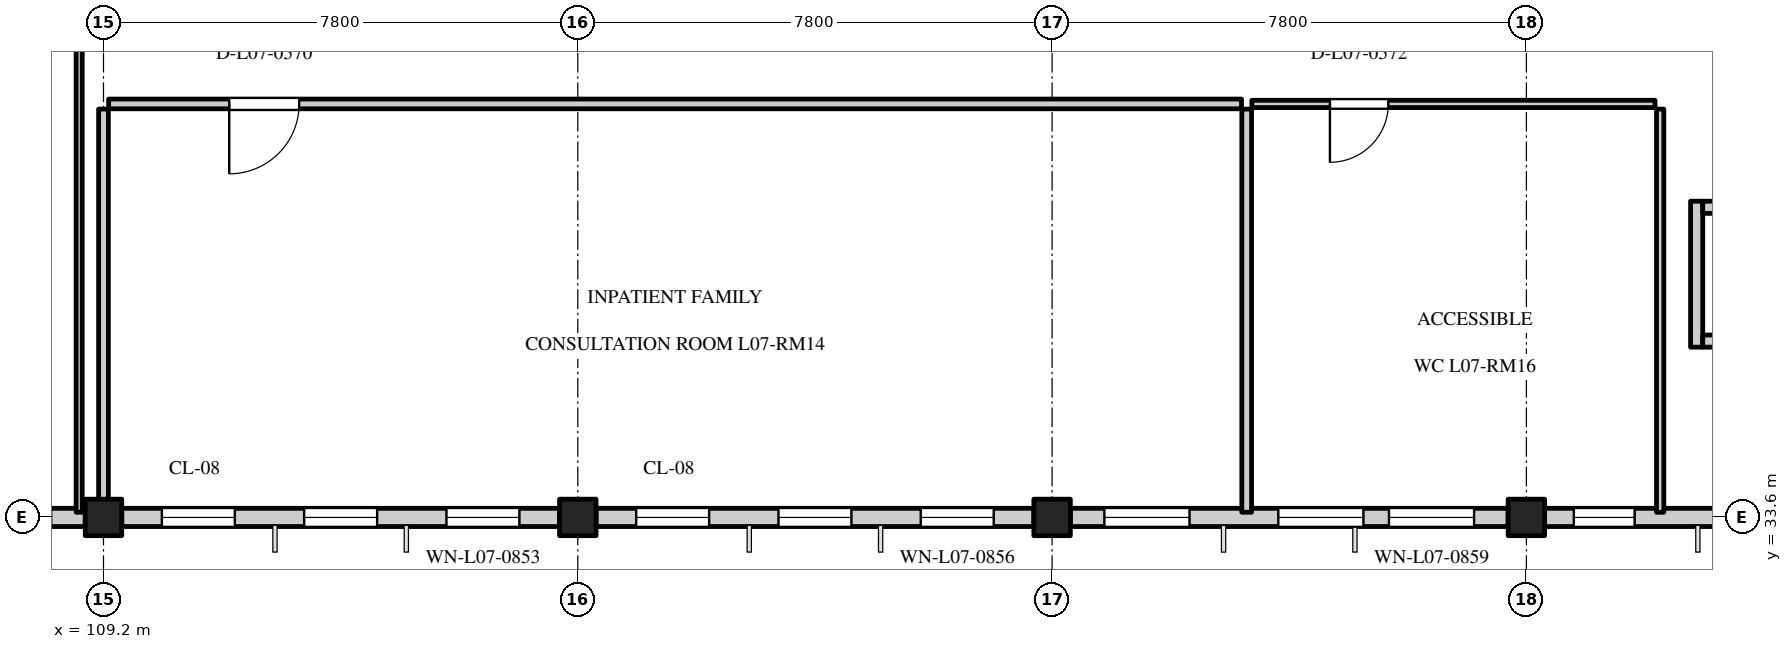
"""IFC4 building model, lengths in metres.
Left out: names, types, materials, properties, quantities, classifications, styles, units other than length and angle.
Written with IfcOpenShell. Run it as: python <this file> out.ifc"""

import sys

from ifc_helpers import new_model, si_unit, direction, frame, frame_2d, origin, origin_2d, place, context, subcontext, project, spatial, rectangle, extrude, element, fill, save


model = new_model("IFC4")
c1 = context("Model", 3, precision=1e-05, world=origin(), true_north=direction((0.0, 1.0)))
c2 = subcontext(c1, "Body", "Model", "MODEL_VIEW")
j1 = project(units=[si_unit("LENGTHUNIT", "METRE"), si_unit("PLANEANGLEUNIT", "RADIAN")], contexts=[c1])
p1 = place(None, origin())
s1 = spatial("IfcSite", under=j1, at=p1, CompositionType="ELEMENT")
p2 = place(p1, origin())
s2 = spatial("IfcBuilding", under=s1, at=p2, CompositionType="ELEMENT")
p3 = place(p2, frame((0.0, 0.0, 29.7)))
s3 = spatial("IfcBuildingStorey", under=s2, at=p3, CompositionType="ELEMENT", Elevation=29.7)
for number, where, z_axis, x_axis in (
    (1, (109.2, 33.6, 0.0), (0.0, 0.0, 1.0), (1.0, 0.0, 0.0)),
    (2, (117.0, 33.6, 0.0), (0.0, 0.0, 1.0), (1.0, 0.0, 0.0)),
    (3, (124.8, 33.6, 0.0), (0.0, 0.0, 1.0), (1.0, 0.0, 0.0)),
    (4, (132.6, 33.6, 0.0), (0.0, 0.0, 1.0), (1.0, 0.0, 0.0)),
):
    element("IfcColumn", number, at=place(p3, frame(where, z_axis=z_axis, x_axis=x_axis)), inside=s3, PredefinedType="COLUMN", context=c2, shape_type="SweptSolid", body=[
        extrude(rectangle(XDim=0.6, YDim=0.6, at=origin_2d()), origin(), (0.0, 0.0, 1.0), 4.2),
    ])
p4 = place(p3, frame((101.7, 33.6, 0.0), z_axis=(0.0, 0.0, 1.0), x_axis=(1.0, 0.0, 0.0)))
e5 = element("IfcWall", 5, at=p4, inside=s3, PredefinedType="STANDARD", context=c2, shape_type="SweptSolid", body=[
    extrude(rectangle(XDim=7.2, YDim=0.3, at=frame_2d((3.6, 0.0))), origin(), (0.0, 0.0, 1.0), 3.25),
])
p5 = place(p4, frame((0.56, 0.0, 0.8)))
e6 = element("IfcOpeningElement", 6, at=p5, cuts=e5, PredefinedType="OPENING", context=c2, shape_type="SweptSolid", body=[
    extrude(rectangle(XDim=1.4, YDim=1.45, at=frame_2d((0.7, 0.725))), frame((0.0, 0.162, 0.0), z_axis=(0.0, -1.0, 0.0), x_axis=(1.0, 0.0, 0.0)), (0.0, 0.0, 1.0), 0.324),
])
p6 = place(p4, frame((2.9, 0.0, 0.8)))
e7 = element("IfcOpeningElement", 7, at=p6, cuts=e5, PredefinedType="OPENING", context=c2, shape_type="SweptSolid", body=[
    extrude(rectangle(XDim=1.4, YDim=1.45, at=frame_2d((0.7, 0.725))), frame((0.0, 0.162, 0.0), z_axis=(0.0, -1.0, 0.0), x_axis=(1.0, 0.0, 0.0)), (0.0, 0.0, 1.0), 0.324),
])
p7 = place(p4, frame((5.24, 0.0, 0.8)))
e8 = element("IfcOpeningElement", 8, at=p7, cuts=e5, PredefinedType="OPENING", context=c2, shape_type="SweptSolid", body=[
    extrude(rectangle(XDim=1.4, YDim=1.45, at=frame_2d((0.7, 0.725))), frame((0.0, 0.162, 0.0), z_axis=(0.0, -1.0, 0.0), x_axis=(1.0, 0.0, 0.0)), (0.0, 0.0, 1.0), 0.324),
])
p8 = place(p3, frame((109.5, 33.6, 0.0), z_axis=(0.0, 0.0, 1.0), x_axis=(1.0, 0.0, 0.0)))
e9 = element("IfcWall", 9, at=p8, inside=s3, PredefinedType="STANDARD", context=c2, shape_type="SweptSolid", body=[
    extrude(rectangle(XDim=7.2, YDim=0.3, at=frame_2d((3.6, 0.0))), origin(), (0.0, 0.0, 1.0), 3.25),
])
p9 = place(p8, frame((0.66, 0.0, 0.8)))
e10 = element("IfcOpeningElement", 10, at=p9, cuts=e9, PredefinedType="OPENING", context=c2, shape_type="SweptSolid", body=[
    extrude(rectangle(XDim=1.2, YDim=1.55, at=frame_2d((0.6, 0.775))), frame((0.0, 0.162, 0.0), z_axis=(0.0, -1.0, 0.0), x_axis=(1.0, 0.0, 0.0)), (0.0, 0.0, 1.0), 0.324),
])
p10 = place(p8, frame((3.0, 0.0, 0.8)))
e11 = element("IfcOpeningElement", 11, at=p10, cuts=e9, PredefinedType="OPENING", context=c2, shape_type="SweptSolid", body=[
    extrude(rectangle(XDim=1.2, YDim=1.55, at=frame_2d((0.6, 0.775))), frame((0.0, 0.162, 0.0), z_axis=(0.0, -1.0, 0.0), x_axis=(1.0, 0.0, 0.0)), (0.0, 0.0, 1.0), 0.324),
])
p11 = place(p8, frame((5.34, 0.0, 0.8)))
e12 = element("IfcOpeningElement", 12, at=p11, cuts=e9, PredefinedType="OPENING", context=c2, shape_type="SweptSolid", body=[
    extrude(rectangle(XDim=1.2, YDim=1.55, at=frame_2d((0.6, 0.775))), frame((0.0, 0.162, 0.0), z_axis=(0.0, -1.0, 0.0), x_axis=(1.0, 0.0, 0.0)), (0.0, 0.0, 1.0), 0.324),
])
p12 = place(p3, frame((117.3, 33.6, 0.0), z_axis=(0.0, 0.0, 1.0), x_axis=(1.0, 0.0, 0.0)))
e13 = element("IfcWall", 13, at=p12, inside=s3, PredefinedType="STANDARD", context=c2, shape_type="SweptSolid", body=[
    extrude(rectangle(XDim=7.2, YDim=0.3, at=frame_2d((3.6, 0.0))), origin(), (0.0, 0.0, 1.0), 3.25),
])
p13 = place(p12, frame((0.66, 0.0, 0.8)))
e14 = element("IfcOpeningElement", 14, at=p13, cuts=e13, PredefinedType="OPENING", context=c2, shape_type="SweptSolid", body=[
    extrude(rectangle(XDim=1.2, YDim=1.4, at=frame_2d((0.6, 0.7))), frame((0.0, 0.162, 0.0), z_axis=(0.0, -1.0, 0.0), x_axis=(1.0, 0.0, 0.0)), (0.0, 0.0, 1.0), 0.324),
])
p14 = place(p12, frame((3.0, 0.0, 0.8)))
e15 = element("IfcOpeningElement", 15, at=p14, cuts=e13, PredefinedType="OPENING", context=c2, shape_type="SweptSolid", body=[
    extrude(rectangle(XDim=1.2, YDim=1.4, at=frame_2d((0.6, 0.7))), frame((0.0, 0.162, 0.0), z_axis=(0.0, -1.0, 0.0), x_axis=(1.0, 0.0, 0.0)), (0.0, 0.0, 1.0), 0.324),
])
p15 = place(p12, frame((5.34, 0.0, 0.8)))
e16 = element("IfcOpeningElement", 16, at=p15, cuts=e13, PredefinedType="OPENING", context=c2, shape_type="SweptSolid", body=[
    extrude(rectangle(XDim=1.2, YDim=1.4, at=frame_2d((0.6, 0.7))), frame((0.0, 0.162, 0.0), z_axis=(0.0, -1.0, 0.0), x_axis=(1.0, 0.0, 0.0)), (0.0, 0.0, 1.0), 0.324),
])
p16 = place(p3, frame((125.1, 33.6, 0.0), z_axis=(0.0, 0.0, 1.0), x_axis=(1.0, 0.0, 0.0)))
e17 = element("IfcWall", 17, at=p16, inside=s3, PredefinedType="STANDARD", context=c2, shape_type="SweptSolid", body=[
    extrude(rectangle(XDim=7.2, YDim=0.3, at=frame_2d((3.6, 0.0))), origin(), (0.0, 0.0, 1.0), 3.25),
])
p17 = place(p16, frame((0.56, 0.0, 0.8)))
e18 = element("IfcOpeningElement", 18, at=p17, cuts=e17, PredefinedType="OPENING", context=c2, shape_type="SweptSolid", body=[
    extrude(rectangle(XDim=1.4, YDim=1.6, at=frame_2d((0.7, 0.8))), frame((0.0, 0.162, 0.0), z_axis=(0.0, -1.0, 0.0), x_axis=(1.0, 0.0, 0.0)), (0.0, 0.0, 1.0), 0.324),
])
p18 = place(p16, frame((3.42, 0.0, 0.8)))
e19 = element("IfcOpeningElement", 19, at=p18, cuts=e17, PredefinedType="OPENING", context=c2, shape_type="SweptSolid", body=[
    extrude(rectangle(XDim=1.4, YDim=1.6, at=frame_2d((0.7, 0.8))), frame((0.0, 0.162, 0.0), z_axis=(0.0, -1.0, 0.0), x_axis=(1.0, 0.0, 0.0)), (0.0, 0.0, 1.0), 0.324),
])
p19 = place(p16, frame((5.24, 0.0, 0.8)))
e20 = element("IfcOpeningElement", 20, at=p19, cuts=e17, PredefinedType="OPENING", context=c2, shape_type="SweptSolid", body=[
    extrude(rectangle(XDim=1.4, YDim=1.6, at=frame_2d((0.7, 0.8))), frame((0.0, 0.162, 0.0), z_axis=(0.0, -1.0, 0.0), x_axis=(1.0, 0.0, 0.0)), (0.0, 0.0, 1.0), 0.324),
])
p20 = place(p3, frame((132.9, 33.6, 0.0), z_axis=(0.0, 0.0, 1.0), x_axis=(1.0, 0.0, 0.0)))
e21 = element("IfcWall", 21, at=p20, inside=s3, PredefinedType="STANDARD", context=c2, shape_type="SweptSolid", body=[
    extrude(rectangle(XDim=7.2, YDim=0.3, at=frame_2d((3.6, 0.0))), origin(), (0.0, 0.0, 1.0), 3.25),
])
p21 = place(p20, frame((0.48, 0.0, 0.8)))
e22 = element("IfcOpeningElement", 22, at=p21, cuts=e21, PredefinedType="OPENING", context=c2, shape_type="SweptSolid", body=[
    extrude(rectangle(XDim=1.0, YDim=1.45, at=frame_2d((0.5, 0.725))), frame((0.0, 0.162, 0.0), z_axis=(0.0, -1.0, 0.0), x_axis=(1.0, 0.0, 0.0)), (0.0, 0.0, 1.0), 0.324),
])
p22 = place(p20, frame((2.9, 0.0, 0.8)))
e23 = element("IfcOpeningElement", 23, at=p22, cuts=e21, PredefinedType="OPENING", context=c2, shape_type="SweptSolid", body=[
    extrude(rectangle(XDim=1.4, YDim=1.45, at=frame_2d((0.7, 0.725))), frame((0.0, 0.162, 0.0), z_axis=(0.0, -1.0, 0.0), x_axis=(1.0, 0.0, 0.0)), (0.0, 0.0, 1.0), 0.324),
])
p23 = place(p20, frame((5.24, 0.0, 0.8)))
e24 = element("IfcOpeningElement", 24, at=p23, cuts=e21, PredefinedType="OPENING", context=c2, shape_type="SweptSolid", body=[
    extrude(rectangle(XDim=1.4, YDim=1.45, at=frame_2d((0.7, 0.725))), frame((0.0, 0.162, 0.0), z_axis=(0.0, -1.0, 0.0), x_axis=(1.0, 0.0, 0.0)), (0.0, 0.0, 1.0), 0.324),
])
p24 = place(p3, frame((135.4, 36.4, 0.0), z_axis=(0.0, 0.0, 1.0), x_axis=(0.0, 1.0, 0.0)))
e25 = element("IfcWall", 25, at=p24, inside=s3, PredefinedType="STANDARD", context=c2, shape_type="SweptSolid", body=[
    extrude(rectangle(XDim=2.4, YDim=0.2, at=frame_2d((1.2, 0.0))), origin(), (0.0, 0.0, 1.0), 3.9),
])
for number, where, z_axis, x_axis in (
    (26, (135.5, 36.5, 0.0), (0.0, 0.0, 1.0), (1.0, 0.0, 0.0)),
    (27, (135.5, 38.7, 0.0), (0.0, 0.0, 1.0), (1.0, 0.0, 0.0)),
):
    element("IfcWall", number, at=place(p3, frame(where, z_axis=z_axis, x_axis=x_axis)), inside=s3, PredefinedType="STANDARD", context=c2, shape_type="SweptSolid", body=[
        extrude(rectangle(XDim=2.0, YDim=0.2, at=frame_2d((1.0, 0.0))), origin(), (0.0, 0.0, 1.0), 3.9),
    ])
p25 = place(p3, frame((108.8, 33.685, 0.0), z_axis=(0.0, 0.0, 1.0), x_axis=(0.0, 1.0, 0.0)))
e28 = element("IfcWall", 28, at=p25, inside=s3, PredefinedType="PARTITIONING", context=c2, shape_type="SweptSolid", body=[
    extrude(rectangle(XDim=11.43, YDim=0.1, at=frame_2d((5.715, 0.0))), origin(), (0.0, 0.0, 1.0), 3.88),
])
p26 = place(p3, frame((109.285, 40.4, 0.0), z_axis=(0.0, 0.0, 1.0), x_axis=(1.0, 0.0, 0.0)))
e29 = element("IfcWall", 29, at=p26, inside=s3, PredefinedType="PARTITIONING", context=c2, shape_type="SweptSolid", body=[
    extrude(rectangle(XDim=18.63, YDim=0.16, at=frame_2d((9.315, 0.0))), origin(), (0.0, 0.0, 1.0), 3.88),
])
p27 = place(p26, frame((1.983, 0.0, 0.0)))
e30 = element("IfcOpeningElement", 30, at=p27, cuts=e29, PredefinedType="OPENING", context=c2, shape_type="SweptSolid", body=[
    extrude(rectangle(XDim=1.15, YDim=2.15, at=frame_2d((0.575, 1.075))), frame((0.0, 0.092, 0.0), z_axis=(0.0, -1.0, 0.0), x_axis=(1.0, 0.0, 0.0)), (0.0, 0.0, 1.0), 0.184),
])
for number, where, z_axis, x_axis in (
    (31, (116.74, 33.6, 0.0), (0.0, 0.0, 1.0), (1.0, 0.0, 0.0)),
    (32, (124.54, 33.6, 0.0), (0.0, 0.0, 1.0), (1.0, 0.0, 0.0)),
):
    element("IfcWall", number, at=place(p3, frame(where, z_axis=z_axis, x_axis=x_axis)), inside=s3, PredefinedType="PARTITIONING", context=c2, shape_type="SweptSolid", body=[
        extrude(rectangle(XDim=0.52, YDim=0.16, at=frame_2d((0.26, 0.0))), origin(), (0.0, 0.0, 1.0), 3.25),
    ])
for number, where, z_axis, x_axis in (
    (33, (109.2, 33.685, 0.0), (0.0, 0.0, 1.0), (0.0, 1.0, 0.0)),
    (34, (128.0, 33.685, 0.0), (0.0, 0.0, 1.0), (0.0, 1.0, 0.0)),
):
    element("IfcWall", number, at=place(p3, frame(where, z_axis=z_axis, x_axis=x_axis)), inside=s3, PredefinedType="PARTITIONING", context=c2, shape_type="SweptSolid", body=[
        extrude(rectangle(XDim=6.63, YDim=0.16, at=frame_2d((3.315, 0.0))), origin(), (0.0, 0.0, 1.0), 3.88),
    ])
p28 = place(p3, frame((128.085, 40.4, 0.0), z_axis=(0.0, 0.0, 1.0), x_axis=(1.0, 0.0, 0.0)))
e35 = element("IfcWall", 35, at=p28, inside=s3, PredefinedType="PARTITIONING", context=c2, shape_type="SweptSolid", body=[
    extrude(rectangle(XDim=6.63, YDim=0.12, at=frame_2d((3.315, 0.0))), origin(), (0.0, 0.0, 1.0), 3.88),
])
p29 = place(p28, frame((1.284, 0.0, 0.0)))
e36 = element("IfcOpeningElement", 36, at=p29, cuts=e35, PredefinedType="OPENING", context=c2, shape_type="SweptSolid", body=[
    extrude(rectangle(XDim=0.96, YDim=2.12, at=frame_2d((0.48, 1.06))), frame((0.0, 0.072, 0.0), z_axis=(0.0, -1.0, 0.0), x_axis=(1.0, 0.0, 0.0)), (0.0, 0.0, 1.0), 0.144),
])
p30 = place(p3, frame((132.34, 33.6, 0.0), z_axis=(0.0, 0.0, 1.0), x_axis=(1.0, 0.0, 0.0)))
e37 = element("IfcWall", 37, at=p30, inside=s3, PredefinedType="PARTITIONING", context=c2, shape_type="SweptSolid", body=[
    extrude(rectangle(XDim=0.52, YDim=0.12, at=frame_2d((0.26, 0.0))), origin(), (0.0, 0.0, 1.0), 3.25),
])
p31 = place(p3, frame((134.8, 33.685, 0.0), z_axis=(0.0, 0.0, 1.0), x_axis=(0.0, 1.0, 0.0)))
e38 = element("IfcWall", 38, at=p31, inside=s3, PredefinedType="PARTITIONING", context=c2, shape_type="SweptSolid", body=[
    extrude(rectangle(XDim=6.63, YDim=0.12, at=frame_2d((3.315, 0.0))), origin(), (0.0, 0.0, 1.0), 3.88),
])
p32 = place(p9, origin())
e39 = element("IfcWindow", 39, at=p32, inside=s3, PartitioningType="SINGLE_PANEL", PredefinedType="WINDOW", context=c2, shape_type="SweptSolid", body=[
    extrude(rectangle(XDim=1.2, YDim=1.55, at=frame_2d((0.6, 0.775))), frame((0.0, 0.03, 0.0), z_axis=(0.0, -1.0, 0.0), x_axis=(1.0, 0.0, 0.0)), (0.0, 0.0, 1.0), 0.06),
])
fill(e10, e39)
p33 = place(p10, origin())
e40 = element("IfcWindow", 40, at=p33, inside=s3, PartitioningType="SINGLE_PANEL", PredefinedType="WINDOW", context=c2, shape_type="SweptSolid", body=[
    extrude(rectangle(XDim=1.2, YDim=1.55, at=frame_2d((0.6, 0.775))), frame((0.0, 0.03, 0.0), z_axis=(0.0, -1.0, 0.0), x_axis=(1.0, 0.0, 0.0)), (0.0, 0.0, 1.0), 0.06),
])
fill(e11, e40)
p34 = place(p11, origin())
e41 = element("IfcWindow", 41, at=p34, inside=s3, PartitioningType="SINGLE_PANEL", PredefinedType="WINDOW", context=c2, shape_type="SweptSolid", body=[
    extrude(rectangle(XDim=1.2, YDim=1.55, at=frame_2d((0.6, 0.775))), frame((0.0, 0.03, 0.0), z_axis=(0.0, -1.0, 0.0), x_axis=(1.0, 0.0, 0.0)), (0.0, 0.0, 1.0), 0.06),
])
fill(e12, e41)
p35 = place(p13, origin())
e42 = element("IfcWindow", 42, at=p35, inside=s3, PartitioningType="SINGLE_PANEL", PredefinedType="WINDOW", context=c2, shape_type="SweptSolid", body=[
    extrude(rectangle(XDim=1.2, YDim=1.4, at=frame_2d((0.6, 0.7))), frame((0.0, 0.03, 0.0), z_axis=(0.0, -1.0, 0.0), x_axis=(1.0, 0.0, 0.0)), (0.0, 0.0, 1.0), 0.06),
])
fill(e14, e42)
p36 = place(p14, origin())
e43 = element("IfcWindow", 43, at=p36, inside=s3, PartitioningType="SINGLE_PANEL", PredefinedType="WINDOW", context=c2, shape_type="SweptSolid", body=[
    extrude(rectangle(XDim=1.2, YDim=1.4, at=frame_2d((0.6, 0.7))), frame((0.0, 0.03, 0.0), z_axis=(0.0, -1.0, 0.0), x_axis=(1.0, 0.0, 0.0)), (0.0, 0.0, 1.0), 0.06),
])
fill(e15, e43)
p37 = place(p15, origin())
e44 = element("IfcWindow", 44, at=p37, inside=s3, PartitioningType="SINGLE_PANEL", PredefinedType="WINDOW", context=c2, shape_type="SweptSolid", body=[
    extrude(rectangle(XDim=1.2, YDim=1.4, at=frame_2d((0.6, 0.7))), frame((0.0, 0.03, 0.0), z_axis=(0.0, -1.0, 0.0), x_axis=(1.0, 0.0, 0.0)), (0.0, 0.0, 1.0), 0.06),
])
fill(e16, e44)
p38 = place(p17, origin())
e45 = element("IfcWindow", 45, at=p38, inside=s3, PartitioningType="SINGLE_PANEL", PredefinedType="WINDOW", context=c2, shape_type="SweptSolid", body=[
    extrude(rectangle(XDim=1.4, YDim=1.6, at=frame_2d((0.7, 0.8))), frame((0.0, 0.03, 0.0), z_axis=(0.0, -1.0, 0.0), x_axis=(1.0, 0.0, 0.0)), (0.0, 0.0, 1.0), 0.06),
])
fill(e18, e45)
p39 = place(p18, origin())
e46 = element("IfcWindow", 46, at=p39, inside=s3, PartitioningType="SINGLE_PANEL", PredefinedType="WINDOW", context=c2, shape_type="SweptSolid", body=[
    extrude(rectangle(XDim=1.4, YDim=1.6, at=frame_2d((0.7, 0.8))), frame((0.0, 0.03, 0.0), z_axis=(0.0, -1.0, 0.0), x_axis=(1.0, 0.0, 0.0)), (0.0, 0.0, 1.0), 0.06),
])
fill(e19, e46)
p40 = place(p19, origin())
e47 = element("IfcWindow", 47, at=p40, inside=s3, PartitioningType="SINGLE_PANEL", PredefinedType="WINDOW", context=c2, shape_type="SweptSolid", body=[
    extrude(rectangle(XDim=1.4, YDim=1.6, at=frame_2d((0.7, 0.8))), frame((0.0, 0.03, 0.0), z_axis=(0.0, -1.0, 0.0), x_axis=(1.0, 0.0, 0.0)), (0.0, 0.0, 1.0), 0.06),
])
fill(e20, e47)
p41 = place(p21, origin())
e48 = element("IfcWindow", 48, at=p41, inside=s3, PartitioningType="SINGLE_PANEL", PredefinedType="WINDOW", context=c2, shape_type="SweptSolid", body=[
    extrude(rectangle(XDim=1.0, YDim=1.45, at=frame_2d((0.5, 0.725))), frame((0.0, 0.03, 0.0), z_axis=(0.0, -1.0, 0.0), x_axis=(1.0, 0.0, 0.0)), (0.0, 0.0, 1.0), 0.06),
])
fill(e22, e48)
p42 = place(p27, frame((1.15, 0.0, 0.0), z_axis=(0.0, 0.0, 1.0), x_axis=(-1.0, 0.0, 0.0)))
e49 = element("IfcDoor", 49, at=p42, inside=s3, OperationType="SINGLE_SWING_RIGHT", PredefinedType="DOOR", context=c2, shape_type="SweptSolid", body=[
    extrude(rectangle(XDim=1.15, YDim=2.15, at=frame_2d((0.575, 1.075))), frame((0.0, 0.025, 0.0), z_axis=(0.0, -1.0, 0.0), x_axis=(1.0, 0.0, 0.0)), (0.0, 0.0, 1.0), 0.05),
])
fill(e30, e49)
p43 = place(p29, frame((0.96, 0.0, 0.0), z_axis=(0.0, 0.0, 1.0), x_axis=(-1.0, 0.0, 0.0)))
e50 = element("IfcDoor", 50, at=p43, inside=s3, OperationType="SINGLE_SWING_RIGHT", PredefinedType="DOOR", context=c2, shape_type="SweptSolid", body=[
    extrude(rectangle(XDim=0.96, YDim=2.12, at=frame_2d((0.48, 1.06))), frame((0.0, 0.025, 0.0), z_axis=(0.0, -1.0, 0.0), x_axis=(1.0, 0.0, 0.0)), (0.0, 0.0, 1.0), 0.05),
])
fill(e36, e50)
save(model, sys.argv[1])
